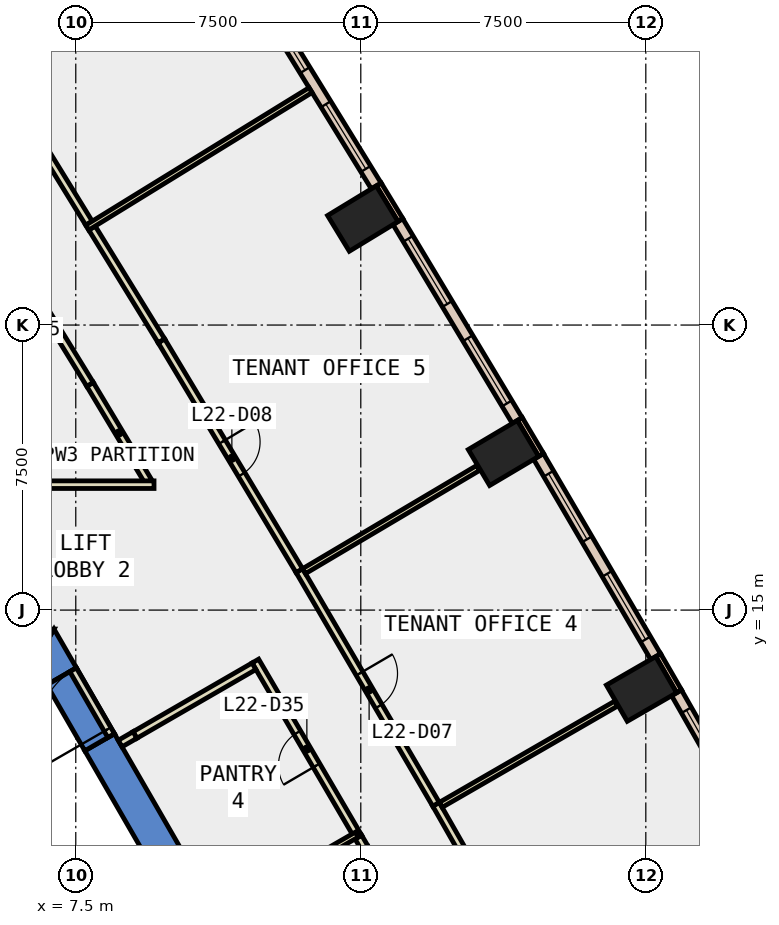
"""IFC4 building model, lengths in metres.
Left out: names, types, materials, properties, quantities, classifications, styles, units other than length and angle.
Written with IfcOpenShell. Run it as: python <this file> out.ifc"""

import sys

from ifc_helpers import new_model, si_unit, direction, frame, frame_2d, origin, origin_2d, place, context, subcontext, project, spatial, polyline, rectangle, outline, extrude, element, fill, save


model = new_model("IFC4")
c1 = context("Model", 3, precision=1e-05, world=origin(), true_north=direction((0.0, 1.0)))
c2 = subcontext(c1, "Body", "Model", "MODEL_VIEW")
j1 = project(units=[si_unit("LENGTHUNIT", "METRE"), si_unit("PLANEANGLEUNIT", "RADIAN")], contexts=[c1])
p1 = place(None, origin())
s1 = spatial("IfcSite", under=j1, at=p1, CompositionType="ELEMENT")
p2 = place(p1, origin())
s2 = spatial("IfcBuilding", under=s1, at=p2, CompositionType="ELEMENT")
p3 = place(p2, frame((0.0, 0.0, 103.4)))
s3 = spatial("IfcBuildingStorey", under=s2, at=p3, CompositionType="ELEMENT", Elevation=103.4)
for number, where, z_axis, x_axis in (
    (1, (22.387, 12.925, -0.4), (0.0, 0.0, 1.0), (-0.5, 0.866, 0.0)),
    (2, (18.755, 19.134, -0.4), (0.0, 0.0, 1.0), (-0.51, 0.86, 0.0)),
    (3, (15.053, 25.302, -0.4), (0.0, 0.0, 1.0), (-0.52, 0.854, 0.0)),
):
    element("IfcColumn", number, at=place(p3, frame(where, z_axis=z_axis, x_axis=x_axis)), inside=s3, PredefinedType="COLUMN", context=c2, shape_type="SweptSolid", body=[
        extrude(rectangle(XDim=1.1, YDim=1.5, at=origin_2d()), origin(), (0.0, 0.0, 1.0), 4.2),
    ])
p4 = place(p3, frame((0.0, 0.0, -0.4)))
e4 = element("IfcWall", 4, at=p4, inside=s3, PredefinedType="SHEAR", context=c2, shape_type="SweptSolid", body=[
    extrude(outline(polyline([(8.517, 11.748), (7.738, 11.298), (12.817, 2.5), (13.856, 2.5), (8.517, 11.748)])), origin(), (0.0, 0.0, 1.0), 4.2),
])
p5 = place(p3, frame((0.0, 0.0, -0.4)))
e5 = element("IfcWall", 5, at=p5, inside=s3, PredefinedType="SHEAR", context=c2, shape_type="SweptSolid", body=[
    extrude(outline(polyline([(6.738, 13.03), (7.517, 13.48), (6.928, 14.5), (6.409, 13.6), (6.738, 13.03)])), origin(), (0.0, 0.0, 1.0), 4.2),
])
p6 = place(p3, frame((0.0, 0.0, 3.6)))
e6 = element("IfcWall", 6, at=p6, inside=s3, PredefinedType="SHEAR", context=c2, shape_type="SweptSolid", body=[
    extrude(outline(polyline([(7.517, 13.48), (6.738, 13.03), (7.738, 11.298), (8.517, 11.748), (7.517, 13.48)])), origin(), (0.0, 0.0, 1.0), 0.2),
])
p7 = place(p3, frame((0.0, 0.0, -0.4)))
e7 = element("IfcWall", 7, at=p7, inside=s3, PredefinedType="SHEAR", context=c2, shape_type="SweptSolid", body=[
    extrude(outline(polyline([(4.55, 14.5), (4.55, 13.6), (6.409, 13.6), (6.928, 14.5), (4.55, 14.5)])), origin(), (0.0, 0.0, 1.0), 4.2),
])
p8 = place(p3, frame((23.376, 12.861, 0.0), z_axis=(0.0, 0.0, 1.0), x_axis=(-0.499933745558, 0.866063652425, 0.0)))
e8 = element("IfcWall", 8, at=p8, inside=s3, PredefinedType="STANDARD", context=c2, shape_type="SweptSolid", body=[
    extrude(rectangle(XDim=1.1, YDim=0.15, at=frame_2d((0.55, 0.0))), origin(), (0.0, 0.0, 1.0), 3.8),
])
p9 = place(p3, frame((19.745, 19.082, 0.0), z_axis=(0.0, 0.0, 1.0), x_axis=(-0.510082245696, 0.860125631885, 0.0)))
e9 = element("IfcWall", 9, at=p9, inside=s3, PredefinedType="STANDARD", context=c2, shape_type="SweptSolid", body=[
    extrude(rectangle(XDim=1.1, YDim=0.15, at=frame_2d((0.55, 0.0))), origin(), (0.0, 0.0, 1.0), 3.8),
])
p10 = place(p3, frame((16.044, 25.261, 0.0), z_axis=(0.0, 0.0, 1.0), x_axis=(-0.519869515594, 0.854245682901, 0.0)))
e10 = element("IfcWall", 10, at=p10, inside=s3, PredefinedType="STANDARD", context=c2, shape_type="SweptSolid", body=[
    extrude(rectangle(XDim=1.1, YDim=0.15, at=frame_2d((0.55, 0.0))), origin(), (0.0, 0.0, 1.0), 3.8),
])
p11 = place(p3, frame((26.33, 7.52, 0.0), z_axis=(0.0, 0.0, 1.0), x_axis=(-0.495113375427, 0.868828375154, 0.0)))
e11 = element("IfcWall", 11, at=p11, inside=s3, PredefinedType="STANDARD", context=c2, shape_type="SweptSolid", body=[
    extrude(rectangle(XDim=6.104, YDim=0.3, at=frame_2d((3.052, 0.0))), origin(), (0.0, 0.0, 1.0), 3.8),
])
p12 = place(p11, frame((0.526, 0.0, 0.9)))
e12 = element("IfcOpeningElement", 12, at=p12, cuts=e11, PredefinedType="OPENING", context=c2, shape_type="SweptSolid", body=[
    extrude(rectangle(XDim=2.0, YDim=2.6, at=frame_2d((1.0, 1.3))), frame((0.0, 0.16, 0.0), z_axis=(0.0, -1.0, 0.0), x_axis=(1.0, 0.0, 0.0)), (0.0, 0.0, 1.0), 0.32),
])
p13 = place(p11, frame((3.578, 0.0, 0.9)))
e13 = element("IfcOpeningElement", 13, at=p13, cuts=e11, PredefinedType="OPENING", context=c2, shape_type="SweptSolid", body=[
    extrude(rectangle(XDim=2.0, YDim=2.6, at=frame_2d((1.0, 1.3))), frame((0.0, 0.16, 0.0), z_axis=(0.0, -1.0, 0.0), x_axis=(1.0, 0.0, 0.0)), (0.0, 0.0, 1.0), 0.32),
])
p14 = place(p3, frame((22.759, 13.774, 0.0), z_axis=(0.0, 0.0, 1.0), x_axis=(-0.50490018297, 0.863177736759, 0.0)))
e14 = element("IfcWall", 14, at=p14, inside=s3, PredefinedType="STANDARD", context=c2, shape_type="SweptSolid", body=[
    extrude(rectangle(XDim=6.104, YDim=0.3, at=frame_2d((3.052, 0.0))), origin(), (0.0, 0.0, 1.0), 3.8),
])
p15 = place(p14, frame((0.526, 0.0, 0.9)))
e15 = element("IfcOpeningElement", 15, at=p15, cuts=e14, PredefinedType="OPENING", context=c2, shape_type="SweptSolid", body=[
    extrude(rectangle(XDim=2.0, YDim=2.6, at=frame_2d((1.0, 1.3))), frame((0.0, 0.16, 0.0), z_axis=(0.0, -1.0, 0.0), x_axis=(1.0, 0.0, 0.0)), (0.0, 0.0, 1.0), 0.32),
])
p16 = place(p14, frame((3.578, 0.0, 0.9)))
e16 = element("IfcOpeningElement", 16, at=p16, cuts=e14, PredefinedType="OPENING", context=c2, shape_type="SweptSolid", body=[
    extrude(rectangle(XDim=2.0, YDim=2.6, at=frame_2d((1.0, 1.3))), frame((0.0, 0.16, 0.0), z_axis=(0.0, -1.0, 0.0), x_axis=(1.0, 0.0, 0.0)), (0.0, 0.0, 1.0), 0.32),
])
p17 = place(p3, frame((19.117, 19.987, 0.0), z_axis=(0.0, 0.0, 1.0), x_axis=(-0.514560454873, 0.857454102726, 0.0)))
e17 = element("IfcWall", 17, at=p17, inside=s3, PredefinedType="STANDARD", context=c2, shape_type="SweptSolid", body=[
    extrude(rectangle(XDim=6.104, YDim=0.3, at=frame_2d((3.052, 0.0))), origin(), (0.0, 0.0, 1.0), 3.8),
])
p18 = place(p17, frame((0.526, 0.0, 0.9)))
e18 = element("IfcOpeningElement", 18, at=p18, cuts=e17, PredefinedType="OPENING", context=c2, shape_type="SweptSolid", body=[
    extrude(rectangle(XDim=2.0, YDim=2.6, at=frame_2d((1.0, 1.3))), frame((0.0, 0.16, 0.0), z_axis=(0.0, -1.0, 0.0), x_axis=(1.0, 0.0, 0.0)), (0.0, 0.0, 1.0), 0.32),
])
p19 = place(p17, frame((3.578, 0.0, 0.9)))
e19 = element("IfcOpeningElement", 19, at=p19, cuts=e17, PredefinedType="OPENING", context=c2, shape_type="SweptSolid", body=[
    extrude(rectangle(XDim=2.0, YDim=2.6, at=frame_2d((1.0, 1.3))), frame((0.0, 0.16, 0.0), z_axis=(0.0, -1.0, 0.0), x_axis=(1.0, 0.0, 0.0)), (0.0, 0.0, 1.0), 0.32),
])
p20 = place(p3, frame((15.406, 26.16, 0.0), z_axis=(0.0, 0.0, 1.0), x_axis=(-0.524121974895, 0.851643208998, 0.0)))
e20 = element("IfcWall", 20, at=p20, inside=s3, PredefinedType="STANDARD", context=c2, shape_type="SweptSolid", body=[
    extrude(rectangle(XDim=6.104, YDim=0.3, at=frame_2d((3.052, 0.0))), origin(), (0.0, 0.0, 1.0), 3.8),
])
p21 = place(p20, frame((0.526, 0.0, 0.9)))
e21 = element("IfcOpeningElement", 21, at=p21, cuts=e20, PredefinedType="OPENING", context=c2, shape_type="SweptSolid", body=[
    extrude(rectangle(XDim=2.0, YDim=2.6, at=frame_2d((1.0, 1.3))), frame((0.0, 0.16, 0.0), z_axis=(0.0, -1.0, 0.0), x_axis=(1.0, 0.0, 0.0)), (0.0, 0.0, 1.0), 0.32),
])
p22 = place(p20, frame((3.578, 0.0, 0.9)))
e22 = element("IfcOpeningElement", 22, at=p22, cuts=e20, PredefinedType="OPENING", context=c2, shape_type="SweptSolid", body=[
    extrude(rectangle(XDim=2.0, YDim=2.6, at=frame_2d((1.0, 1.3))), frame((0.0, 0.16, 0.0), z_axis=(0.0, -1.0, 0.0), x_axis=(1.0, 0.0, 0.0)), (0.0, 0.0, 1.0), 0.32),
])
p23 = place(p3, frame((15.112, 8.725, 0.0), z_axis=(0.0, 0.0, 1.0), x_axis=(-0.50443330283, 0.86345066043, 0.0)))
e23 = element("IfcWall", 23, at=p23, inside=s3, PredefinedType="PARTITIONING", context=c2, shape_type="SweptSolid", body=[
    extrude(rectangle(XDim=0.351, YDim=0.2, at=frame_2d((0.175, 0.0))), origin(), (0.0, 0.0, 1.0), 3.8),
])
p24 = place(p3, frame((14.935, 9.028, 0.0), z_axis=(0.0, 0.0, 1.0), x_axis=(-0.504934493304, 0.863157666636, 0.0)))
e24 = element("IfcWall", 24, at=p24, inside=s3, PredefinedType="PARTITIONING", context=c2, shape_type="SweptSolid", body=[
    extrude(rectangle(XDim=5.365, YDim=0.2, at=frame_2d((2.683, 0.0))), origin(), (0.0, 0.0, 1.0), 3.8),
])
p25 = place(p24, frame((2.182, 0.0, 0.0)))
e25 = element("IfcOpeningElement", 25, at=p25, cuts=e24, PredefinedType="OPENING", context=c2, shape_type="SweptSolid", body=[
    extrude(rectangle(XDim=1.0, YDim=2.1, at=frame_2d((0.5, 1.05))), frame((0.0, 0.11, 0.0), z_axis=(0.0, -1.0, 0.0), x_axis=(1.0, 0.0, 0.0)), (0.0, 0.0, 1.0), 0.22),
])
p26 = place(p3, frame((12.19, 13.522, 0.0), z_axis=(0.0, 0.0, 1.0), x_axis=(-0.866000156139, -0.500043727655, 0.0)))
e26 = element("IfcWall", 26, at=p26, inside=s3, PredefinedType="PARTITIONING", context=c2, shape_type="SweptSolid", body=[
    extrude(rectangle(XDim=3.618, YDim=0.2, at=frame_2d((1.809, 0.0))), origin(), (0.0, 0.0, 1.0), 3.8),
])
p27 = place(p3, frame((9.407, 18.386, 0.0), z_axis=(0.0, 0.0, 1.0), x_axis=(-0.514399309837, 0.857550785691, 0.0)))
e27 = element("IfcWall", 27, at=p27, inside=s3, PredefinedType="PARTITIONING", context=c2, shape_type="SweptSolid", body=[
    extrude(rectangle(XDim=2.978, YDim=0.2, at=frame_2d((1.489, 0.0))), origin(), (0.0, 0.0, 1.0), 3.8),
])
p28 = place(p3, frame((7.875, 20.94, 0.0), z_axis=(0.0, 0.0, 1.0), x_axis=(-0.524183774504, 0.851605172921, 0.0)))
e28 = element("IfcWall", 28, at=p28, inside=s3, PredefinedType="PARTITIONING", context=c2, shape_type="SweptSolid", body=[
    extrude(rectangle(XDim=7.099, YDim=0.2, at=frame_2d((3.549, 0.0))), origin(), (0.0, 0.0, 1.0), 3.8),
])
p29 = place(p28, frame((2.649, 0.0, 0.0)))
e29 = element("IfcOpeningElement", 29, at=p29, cuts=e28, PredefinedType="OPENING", context=c2, shape_type="SweptSolid", body=[
    extrude(rectangle(XDim=1.8, YDim=2.1, at=frame_2d((0.9, 1.05))), frame((0.0, 0.11, 0.0), z_axis=(0.0, -1.0, 0.0), x_axis=(1.0, 0.0, 0.0)), (0.0, 0.0, 1.0), 0.22),
])
p30 = place(p3, frame((16.98, 9.89, 0.0), z_axis=(0.0, 0.0, 1.0), x_axis=(0.495123170501, -0.868822793228, 0.0)))
e30 = element("IfcWall", 30, at=p30, inside=s3, PredefinedType="PARTITIONING", context=c2, shape_type="SweptSolid", body=[
    extrude(rectangle(XDim=7.198, YDim=0.2, at=frame_2d((3.599, 0.0))), origin(), (0.0, 0.0, 1.0), 3.8),
])
p31 = place(p30, frame((3.099, 0.0, 0.0)))
e31 = element("IfcOpeningElement", 31, at=p31, cuts=e30, PredefinedType="OPENING", context=c2, shape_type="SweptSolid", body=[
    extrude(rectangle(XDim=1.0, YDim=2.1, at=frame_2d((0.5, 1.05))), frame((0.0, 0.11, 0.0), z_axis=(0.0, -1.0, 0.0), x_axis=(1.0, 0.0, 0.0)), (0.0, 0.0, 1.0), 0.22),
])
p32 = place(p3, frame((13.383, 16.039, 0.0), z_axis=(0.0, 0.0, 1.0), x_axis=(0.504806221623, -0.863232690884, 0.0)))
e32 = element("IfcWall", 32, at=p32, inside=s3, PredefinedType="PARTITIONING", context=c2, shape_type="SweptSolid", body=[
    extrude(rectangle(XDim=7.124, YDim=0.2, at=frame_2d((3.562, 0.0))), origin(), (0.0, 0.0, 1.0), 3.8),
])
p33 = place(p32, frame((3.137, 0.0, 0.0)))
e33 = element("IfcOpeningElement", 33, at=p33, cuts=e32, PredefinedType="OPENING", context=c2, shape_type="SweptSolid", body=[
    extrude(rectangle(XDim=1.0, YDim=2.1, at=frame_2d((0.5, 1.05))), frame((0.0, 0.11, 0.0), z_axis=(0.0, -1.0, 0.0), x_axis=(1.0, 0.0, 0.0)), (0.0, 0.0, 1.0), 0.22),
])
p34 = place(p3, frame((7.927, 25.052, 0.0), z_axis=(0.0, 0.0, 1.0), x_axis=(0.524140390501, -0.851631875311, 0.0)))
e34 = element("IfcWall", 34, at=p34, inside=s3, PredefinedType="PARTITIONING", context=c2, shape_type="SweptSolid", body=[
    extrude(rectangle(XDim=3.487, YDim=0.2, at=frame_2d((1.744, 0.0))), origin(), (0.0, 0.0, 1.0), 3.8),
])
p35 = place(p3, frame((9.755, 22.082, 0.0), z_axis=(0.0, 0.0, 1.0), x_axis=(0.514582342012, -0.857440967816, 0.0)))
e35 = element("IfcWall", 35, at=p35, inside=s3, PredefinedType="PARTITIONING", context=c2, shape_type="SweptSolid", body=[
    extrude(rectangle(XDim=7.049, YDim=0.2, at=frame_2d((3.524, 0.0))), origin(), (0.0, 0.0, 1.0), 3.8),
])
p36 = place(p35, frame((3.1, 0.0, 0.0)))
e36 = element("IfcOpeningElement", 36, at=p36, cuts=e35, PredefinedType="OPENING", context=c2, shape_type="SweptSolid", body=[
    extrude(rectangle(XDim=1.0, YDim=2.1, at=frame_2d((0.5, 1.05))), frame((0.0, 0.11, 0.0), z_axis=(0.0, -1.0, 0.0), x_axis=(1.0, 0.0, 0.0)), (0.0, 0.0, 1.0), 0.22),
])
p37 = place(p3, frame((6.021, 28.149, 0.0), z_axis=(0.0, 0.0, 1.0), x_axis=(0.524062258075, -0.851679957297, 0.0)))
e37 = element("IfcWall", 37, at=p37, inside=s3, PredefinedType="PARTITIONING", context=c2, shape_type="SweptSolid", body=[
    extrude(rectangle(XDim=3.486, YDim=0.2, at=frame_2d((1.743, 0.0))), origin(), (0.0, 0.0, 1.0), 3.8),
])
p38 = place(p3, frame((11.261, 6.994, 0.0), z_axis=(0.0, 0.0, 1.0), x_axis=(0.866037428454, 0.499979172084, 0.0)))
e38 = element("IfcWall", 38, at=p38, inside=s3, PredefinedType="PARTITIONING", context=c2, shape_type="SweptSolid", body=[
    extrude(rectangle(XDim=4.198, YDim=0.15, at=frame_2d((2.099, 0.0))), origin(), (0.0, 0.0, 1.0), 3.8),
])
p39 = place(p3, frame((17.104, 9.875, 0.0), z_axis=(0.0, 0.0, 1.0), x_axis=(0.866024640963, 0.500001321243, 0.0)))
e39 = element("IfcWall", 39, at=p39, inside=s3, PredefinedType="PARTITIONING", context=c2, shape_type="SweptSolid", body=[
    extrude(rectangle(XDim=5.33, YDim=0.15, at=frame_2d((2.665, 0.0))), origin(), (0.0, 0.0, 1.0), 3.8),
])
p40 = place(p3, frame((13.507, 16.025, 0.0), z_axis=(0.0, 0.0, 1.0), x_axis=(0.860289301319, 0.509806157315, 0.0)))
e40 = element("IfcWall", 40, at=p40, inside=s3, PredefinedType="PARTITIONING", context=c2, shape_type="SweptSolid", body=[
    extrude(rectangle(XDim=5.33, YDim=0.15, at=frame_2d((2.665, 0.0))), origin(), (0.0, 0.0, 1.0), 3.8),
])
p41 = place(p3, frame((7.802, 25.064, 0.0), z_axis=(0.0, 0.0, 1.0), x_axis=(0.851596352662, 0.524198103901, 0.0)))
e41 = element("IfcWall", 41, at=p41, inside=s3, PredefinedType="PARTITIONING", context=c2, shape_type="SweptSolid", body=[
    extrude(rectangle(XDim=6.9, YDim=0.15, at=frame_2d((3.45, 0.0))), origin(), (0.0, 0.0, 1.0), 3.8),
])
p42 = place(p3, frame((8.43, 11.698, 0.0), z_axis=(0.0, 0.0, 1.0), x_axis=(-0.50002537861, 0.866010750942, 0.0)))
e42 = element("IfcWall", 42, at=p42, inside=s3, PredefinedType="PARTITIONING", context=c2, shape_type="SweptSolid", body=[
    extrude(rectangle(XDim=2.0, YDim=0.2, at=frame_2d((1.0, 0.0))), origin(), (0.0, 0.0, 1.0), 2.4),
])
p43 = place(p42, frame((0.19, 0.0, 0.0)))
e43 = element("IfcOpeningElement", 43, at=p43, cuts=e42, PredefinedType="OPENING", context=c2, shape_type="SweptSolid", body=[
    extrude(rectangle(XDim=1.8, YDim=2.1, at=frame_2d((0.9, 1.05))), frame((0.0, 0.11, 0.0), z_axis=(0.0, -1.0, 0.0), x_axis=(1.0, 0.0, 0.0)), (0.0, 0.0, 1.0), 0.22),
])
p44 = place(p3, frame((0.4, 18.3, 0.0), z_axis=(0.0, 0.0, 1.0), x_axis=(1.0, 0.0, 0.0)))
e44 = element("IfcWall", 44, at=p44, inside=s3, PredefinedType="PARTITIONING", context=c2, shape_type="SweptSolid", body=[
    extrude(rectangle(XDim=9.159, YDim=0.2, at=frame_2d((4.58, 0.0))), origin(), (0.0, 0.0, 1.0), 3.8),
])
p45 = place(p3, frame((9.057, 11.713, 0.0), z_axis=(0.0, 0.0, 1.0), x_axis=(-0.866266849364, -0.49958157061, 0.0)))
e45 = element("IfcWall", 45, at=p45, inside=s3, PredefinedType="PARTITIONING", context=c2, shape_type="SweptSolid", body=[
    extrude(rectangle(XDim=0.45, YDim=0.2, at=frame_2d((0.225, 0.0))), origin(), (0.0, 0.0, 1.0), 2.4),
])
p46 = place(p3, frame((8.48, 3.412, 0.0), z_axis=(0.0, 0.0, 1.0), x_axis=(-0.499978703459, 0.866037698999, 0.0)))
e46 = element("IfcWall", 46, at=p46, inside=s3, PredefinedType="STANDARD", context=c2, shape_type="SweptSolid", body=[
    extrude(rectangle(XDim=6.9, YDim=0.2, at=frame_2d((3.45, 0.0))), origin(), (0.0, 0.0, 1.0), 3.8),
])
p47 = place(p13, origin())
e47 = element("IfcWindow", 47, at=p47, inside=s3, PartitioningType="SINGLE_PANEL", PredefinedType="WINDOW", context=c2, shape_type="SweptSolid", body=[
    extrude(rectangle(XDim=2.0, YDim=2.6, at=frame_2d((1.0, 1.3))), frame((0.0, 0.03, 0.0), z_axis=(0.0, -1.0, 0.0), x_axis=(1.0, 0.0, 0.0)), (0.0, 0.0, 1.0), 0.06),
])
fill(e13, e47)
p48 = place(p15, origin())
e48 = element("IfcWindow", 48, at=p48, inside=s3, PartitioningType="SINGLE_PANEL", PredefinedType="WINDOW", context=c2, shape_type="SweptSolid", body=[
    extrude(rectangle(XDim=2.0, YDim=2.6, at=frame_2d((1.0, 1.3))), frame((0.0, 0.03, 0.0), z_axis=(0.0, -1.0, 0.0), x_axis=(1.0, 0.0, 0.0)), (0.0, 0.0, 1.0), 0.06),
])
fill(e15, e48)
p49 = place(p16, origin())
e49 = element("IfcWindow", 49, at=p49, inside=s3, PartitioningType="SINGLE_PANEL", PredefinedType="WINDOW", context=c2, shape_type="SweptSolid", body=[
    extrude(rectangle(XDim=2.0, YDim=2.6, at=frame_2d((1.0, 1.3))), frame((0.0, 0.03, 0.0), z_axis=(0.0, -1.0, 0.0), x_axis=(1.0, 0.0, 0.0)), (0.0, 0.0, 1.0), 0.06),
])
fill(e16, e49)
p50 = place(p18, origin())
e50 = element("IfcWindow", 50, at=p50, inside=s3, PartitioningType="SINGLE_PANEL", PredefinedType="WINDOW", context=c2, shape_type="SweptSolid", body=[
    extrude(rectangle(XDim=2.0, YDim=2.6, at=frame_2d((1.0, 1.3))), frame((0.0, 0.03, 0.0), z_axis=(0.0, -1.0, 0.0), x_axis=(1.0, 0.0, 0.0)), (0.0, 0.0, 1.0), 0.06),
])
fill(e18, e50)
p51 = place(p19, origin())
e51 = element("IfcWindow", 51, at=p51, inside=s3, PartitioningType="SINGLE_PANEL", PredefinedType="WINDOW", context=c2, shape_type="SweptSolid", body=[
    extrude(rectangle(XDim=2.0, YDim=2.6, at=frame_2d((1.0, 1.3))), frame((0.0, 0.03, 0.0), z_axis=(0.0, -1.0, 0.0), x_axis=(1.0, 0.0, 0.0)), (0.0, 0.0, 1.0), 0.06),
])
fill(e19, e51)
p52 = place(p21, origin())
e52 = element("IfcWindow", 52, at=p52, inside=s3, PartitioningType="SINGLE_PANEL", PredefinedType="WINDOW", context=c2, shape_type="SweptSolid", body=[
    extrude(rectangle(XDim=2.0, YDim=2.6, at=frame_2d((1.0, 1.3))), frame((0.0, 0.03, 0.0), z_axis=(0.0, -1.0, 0.0), x_axis=(1.0, 0.0, 0.0)), (0.0, 0.0, 1.0), 0.06),
])
fill(e21, e52)
p53 = place(p22, origin())
e53 = element("IfcWindow", 53, at=p53, inside=s3, PartitioningType="SINGLE_PANEL", PredefinedType="WINDOW", context=c2, shape_type="SweptSolid", body=[
    extrude(rectangle(XDim=2.0, YDim=2.6, at=frame_2d((1.0, 1.3))), frame((0.0, 0.03, 0.0), z_axis=(0.0, -1.0, 0.0), x_axis=(1.0, 0.0, 0.0)), (0.0, 0.0, 1.0), 0.06),
])
fill(e22, e53)
p54 = place(p33, origin())
e54 = element("IfcDoor", 54, at=p54, inside=s3, OperationType="SINGLE_SWING_LEFT", PredefinedType="DOOR", context=c2, shape_type="SweptSolid", body=[
    extrude(rectangle(XDim=1.0, YDim=2.1, at=frame_2d((0.5, 1.05))), frame((0.0, 0.025, 0.0), z_axis=(0.0, -1.0, 0.0), x_axis=(1.0, 0.0, 0.0)), (0.0, 0.0, 1.0), 0.05),
])
fill(e33, e54)
p55 = place(p36, origin())
e55 = element("IfcDoor", 55, at=p55, inside=s3, OperationType="SINGLE_SWING_LEFT", PredefinedType="DOOR", context=c2, shape_type="SweptSolid", body=[
    extrude(rectangle(XDim=1.0, YDim=2.1, at=frame_2d((0.5, 1.05))), frame((0.0, 0.025, 0.0), z_axis=(0.0, -1.0, 0.0), x_axis=(1.0, 0.0, 0.0)), (0.0, 0.0, 1.0), 0.05),
])
fill(e36, e55)
p56 = place(p25, origin())
e56 = element("IfcDoor", 56, at=p56, inside=s3, OperationType="SINGLE_SWING_LEFT", PredefinedType="DOOR", context=c2, shape_type="SweptSolid", body=[
    extrude(rectangle(XDim=1.0, YDim=2.1, at=frame_2d((0.5, 1.05))), frame((0.0, 0.025, 0.0), z_axis=(0.0, -1.0, 0.0), x_axis=(1.0, 0.0, 0.0)), (0.0, 0.0, 1.0), 0.05),
])
fill(e25, e56)
p57 = place(p43, origin())
e57 = element("IfcDoor", 57, at=p57, inside=s3, OperationType="DOUBLE_DOOR_SINGLE_SWING", PredefinedType="DOOR", context=c2, shape_type="SweptSolid", body=[
    extrude(rectangle(XDim=1.8, YDim=2.1, at=frame_2d((0.9, 1.05))), frame((0.0, 0.025, 0.0), z_axis=(0.0, -1.0, 0.0), x_axis=(1.0, 0.0, 0.0)), (0.0, 0.0, 1.0), 0.05),
])
fill(e43, e57)
save(model, sys.argv[1])
